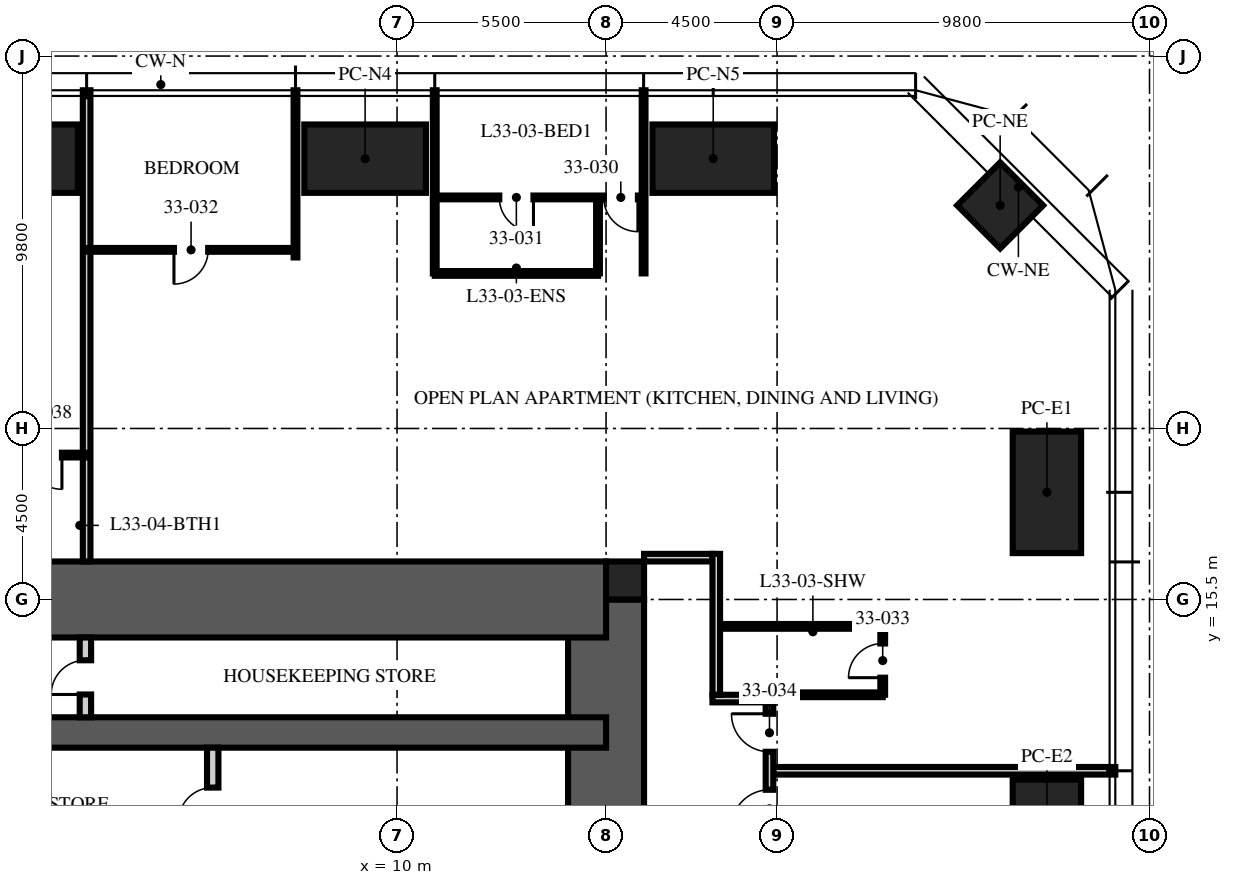
"""IFC4 building model, lengths in metres.
Left out: names, types, materials, properties, quantities, classifications, styles, units other than length and angle.
Written with IfcOpenShell. Run it as: python <this file> out.ifc"""

import sys

from ifc_helpers import new_model, si_unit, direction, frame, frame_2d, origin, origin_2d, place, context, subcontext, project, spatial, rectangle, extrude, element, fill, save


model = new_model("IFC4")
c1 = context("Model", 3, precision=1e-05, world=origin(), true_north=direction((0.0, 1.0)))
c2 = subcontext(c1, "Body", "Model", "MODEL_VIEW")
j1 = project(units=[si_unit("LENGTHUNIT", "METRE"), si_unit("PLANEANGLEUNIT", "RADIAN")], contexts=[c1])
p1 = place(None, origin())
s1 = spatial("IfcSite", under=j1, at=p1, CompositionType="ELEMENT")
p2 = place(p1, origin())
s2 = spatial("IfcBuilding", under=s1, at=p2, CompositionType="ELEMENT")
p3 = place(p2, frame((0.0, 0.0, 133.5)))
s3 = spatial("IfcBuildingStorey", under=s2, at=p3, CompositionType="ELEMENT", Elevation=133.5)
p4 = place(p3, frame((15.5, -15.5, -0.25), z_axis=(0.0, 0.0, 1.0), x_axis=(0.0, 1.0, 0.0)))
e1 = element("IfcWall", 1, at=p4, inside=s3, PredefinedType="SHEAR", context=c2, shape_type="SweptSolid", body=[
    extrude(rectangle(XDim=31.0, YDim=2.0, at=frame_2d((15.5, 0.0))), origin(), (0.0, 0.0, 1.0), 3.75),
])
p5 = place(p4, frame((6.5, 0.0, 0.25)))
e2 = element("IfcOpeningElement", 2, at=p5, cuts=e1, PredefinedType="OPENING", context=c2, shape_type="SweptSolid", body=[
    extrude(rectangle(XDim=1.2, YDim=2.1, at=frame_2d((0.6, 1.05))), frame((0.0, 1.01, 0.0), z_axis=(0.0, -1.0, 0.0), x_axis=(1.0, 0.0, 0.0)), (0.0, 0.0, 1.0), 2.02),
])
p6 = place(p4, frame((23.0, 0.0, 0.25)))
e3 = element("IfcOpeningElement", 3, at=p6, cuts=e1, PredefinedType="OPENING", context=c2, shape_type="SweptSolid", body=[
    extrude(rectangle(XDim=1.8, YDim=2.1, at=frame_2d((0.9, 1.05))), frame((0.0, 1.01, 0.0), z_axis=(0.0, -1.0, 0.0), x_axis=(1.0, 0.0, 0.0)), (0.0, 0.0, 1.0), 2.02),
])
p7 = place(p3, frame((-15.5, 15.5, -0.25), z_axis=(0.0, 0.0, 1.0), x_axis=(1.0, 0.0, 0.0)))
e4 = element("IfcWall", 4, at=p7, inside=s3, PredefinedType="SHEAR", context=c2, shape_type="SweptSolid", body=[
    extrude(rectangle(XDim=31.0, YDim=2.0, at=frame_2d((15.5, 0.0))), origin(), (0.0, 0.0, 1.0), 3.75),
])
p8 = place(p7, frame((5.0, 0.0, 0.25)))
e5 = element("IfcOpeningElement", 5, at=p8, cuts=e4, PredefinedType="OPENING", context=c2, shape_type="SweptSolid", body=[
    extrude(rectangle(XDim=1.0, YDim=2.1, at=frame_2d((0.5, 1.05))), frame((0.0, 1.01, 0.0), z_axis=(0.0, -1.0, 0.0), x_axis=(1.0, 0.0, 0.0)), (0.0, 0.0, 1.0), 2.02),
])
p9 = place(p3, frame((-15.5, 12.0, -0.25), z_axis=(0.0, 0.0, 1.0), x_axis=(1.0, 0.0, 0.0)))
e6 = element("IfcWall", 6, at=p9, inside=s3, PredefinedType="SHEAR", context=c2, shape_type="SweptSolid", body=[
    extrude(rectangle(XDim=31.0, YDim=0.8, at=frame_2d((15.5, 0.0))), origin(), (0.0, 0.0, 1.0), 3.75),
])
p10 = place(p3, frame((16.0, 16.0, -0.25), z_axis=(0.0, 0.0, 1.0), x_axis=(1.0, 0.0, 0.0)))
e7 = element("IfcColumn", 7, at=p10, inside=s3, PredefinedType="COLUMN", context=c2, shape_type="SweptSolid", body=[
    extrude(rectangle(XDim=1.0, YDim=1.0, at=origin_2d()), origin(), (0.0, 0.0, 1.0), 3.75),
])
for number, where, z_axis, x_axis in (
    (8, (0.0, 27.1, 0.0), (0.0, 0.0, 1.0), (1.0, 0.0, 0.0)),
    (9, (9.16, 27.1, 0.0), (0.0, 0.0, 1.0), (1.0, 0.0, 0.0)),
    (10, (18.32, 27.1, 0.0), (0.0, 0.0, 1.0), (1.0, 0.0, 0.0)),
    (11, (27.1, 18.32, 0.0), (0.0, 0.0, 1.0), (0.0, 1.0, 0.0)),
    (12, (27.1, 9.16, 0.0), (0.0, 0.0, 1.0), (0.0, 1.0, 0.0)),
):
    element("IfcColumn", number, at=place(p3, frame(where, z_axis=z_axis, x_axis=x_axis)), inside=s3, PredefinedType="COLUMN", context=c2, shape_type="SweptSolid", body=[
        extrude(rectangle(XDim=3.2, YDim=1.8, at=origin_2d()), origin(), (0.0, 0.0, 1.0), 3.75),
    ])
p11 = place(p3, frame((25.87, 25.87, 0.0), z_axis=(0.0, 0.0, 1.0), x_axis=(0.707106781187, -0.707106781187, 0.0)))
e13 = element("IfcColumn", 13, at=p11, inside=s3, PredefinedType="COLUMN", context=c2, shape_type="SweptSolid", body=[
    extrude(rectangle(XDim=1.6, YDim=1.6, at=origin_2d()), origin(), (0.0, 0.0, 1.0), 3.75),
])
p12 = place(p3, frame((5.15, 5.3, 0.0), z_axis=(0.0, 0.0, 1.0), x_axis=(0.0, 1.0, 0.0)))
e14 = element("IfcWall", 14, at=p12, inside=s3, PredefinedType="PARTITIONING", context=c2, shape_type="SweptSolid", body=[
    extrude(rectangle(XDim=6.3, YDim=0.3, at=frame_2d((3.15, 0.0))), origin(), (0.0, 0.0, 1.0), 3.5),
])
p13 = place(p12, frame((4.35, 0.0, 0.0)))
e15 = element("IfcOpeningElement", 15, at=p13, cuts=e14, PredefinedType="OPENING", context=c2, shape_type="SweptSolid", body=[
    extrude(rectangle(XDim=0.9, YDim=2.1, at=frame_2d((0.45, 1.05))), frame((0.0, 0.16, 0.0), z_axis=(0.0, -1.0, 0.0), x_axis=(1.0, 0.0, 0.0)), (0.0, 0.0, 1.0), 0.32),
])
p14 = place(p3, frame((1.8, 12.4, 0.0), z_axis=(0.0, 0.0, 1.0), x_axis=(0.0, 1.0, 0.0)))
e16 = element("IfcWall", 16, at=p14, inside=s3, PredefinedType="PARTITIONING", context=c2, shape_type="SweptSolid", body=[
    extrude(rectangle(XDim=2.1, YDim=0.3, at=frame_2d((1.05, 0.0))), origin(), (0.0, 0.0, 1.0), 3.5),
])
p15 = place(p14, frame((0.6, 0.0, 0.0)))
e17 = element("IfcOpeningElement", 17, at=p15, cuts=e16, PredefinedType="OPENING", context=c2, shape_type="SweptSolid", body=[
    extrude(rectangle(XDim=0.9, YDim=2.1, at=frame_2d((0.45, 1.05))), frame((0.0, 0.16, 0.0), z_axis=(0.0, -1.0, 0.0), x_axis=(1.0, 0.0, 0.0)), (0.0, 0.0, 1.0), 0.32),
])
p16 = place(p3, frame((16.5, 16.6, 0.0), z_axis=(0.0, 0.0, 1.0), x_axis=(1.0, 0.0, 0.0)))
e18 = element("IfcWall", 18, at=p16, inside=s3, PredefinedType="PARTITIONING", context=c2, shape_type="SweptSolid", body=[
    extrude(rectangle(XDim=1.8, YDim=0.2, at=frame_2d((0.9, 0.0))), origin(), (0.0, 0.0, 1.0), 2.3),
])
p17 = place(p3, frame((19.9, 10.992, 0.0), z_axis=(0.0, 0.0, 1.0), x_axis=(1.0, 0.0, 0.0)))
e19 = element("IfcWall", 19, at=p17, inside=s3, PredefinedType="PARTITIONING", context=c2, shape_type="SweptSolid", body=[
    extrude(rectangle(XDim=9.0, YDim=0.2, at=frame_2d((4.5, 0.0))), origin(), (0.0, 0.0, 1.0), 2.81),
])
for number, where, z_axis, x_axis in (
    (20, (16.488, 24.08, 0.0), (0.0, 0.0, 1.0), (0.0, 1.0, 0.0)),
    (21, (10.992, 24.08, 0.0), (0.0, 0.0, 1.0), (0.0, 1.0, 0.0)),
):
    element("IfcWall", number, at=place(p3, frame(where, z_axis=z_axis, x_axis=x_axis)), inside=s3, PredefinedType="PARTITIONING", context=c2, shape_type="SweptSolid", body=[
        extrude(rectangle(XDim=4.82, YDim=0.1, at=frame_2d((2.41, 0.0))), origin(), (0.0, 0.0, 1.0), 2.81),
    ])
p18 = place(p3, frame((7.328, 24.5, 0.0), z_axis=(0.0, 0.0, 1.0), x_axis=(0.0, 1.0, 0.0)))
e22 = element("IfcWall", 22, at=p18, inside=s3, PredefinedType="PARTITIONING", context=c2, shape_type="SweptSolid", body=[
    extrude(rectangle(XDim=4.4, YDim=0.1, at=frame_2d((2.2, 0.0))), origin(), (0.0, 0.0, 1.0), 2.81),
])
p19 = place(p3, frame((1.832, 16.5, 0.0), z_axis=(0.0, 0.0, 1.0), x_axis=(0.0, 1.0, 0.0)))
e23 = element("IfcWall", 23, at=p19, inside=s3, PredefinedType="PARTITIONING", context=c2, shape_type="SweptSolid", body=[
    extrude(rectangle(XDim=12.4, YDim=0.2, at=frame_2d((6.2, 0.0))), origin(), (0.0, 0.0, 1.0), 2.81),
])
p20 = place(p3, frame((16.488, 26.08, 0.0), z_axis=(0.0, 0.0, 1.0), x_axis=(-1.0, 0.0, 0.0)))
e24 = element("IfcWall", 24, at=p20, inside=s3, PredefinedType="PARTITIONING", context=c2, shape_type="SweptSolid", body=[
    extrude(rectangle(XDim=5.496, YDim=0.1, at=frame_2d((2.748, 0.0))), origin(), (0.0, 0.0, 1.0), 2.81),
])
p21 = place(p20, frame((0.15, 0.0, 0.0)))
e25 = element("IfcOpeningElement", 25, at=p21, cuts=e24, PredefinedType="OPENING", context=c2, shape_type="SweptSolid", body=[
    extrude(rectangle(XDim=0.9, YDim=2.1, at=frame_2d((0.45, 1.05))), frame((0.0, 0.06, 0.0), z_axis=(0.0, -1.0, 0.0), x_axis=(1.0, 0.0, 0.0)), (0.0, 0.0, 1.0), 0.12),
])
p22 = place(p20, frame((2.898, 0.0, 0.0)))
e26 = element("IfcOpeningElement", 26, at=p22, cuts=e24, PredefinedType="OPENING", context=c2, shape_type="SweptSolid", body=[
    extrude(rectangle(XDim=0.9, YDim=2.1, at=frame_2d((0.45, 1.05))), frame((0.0, 0.06, 0.0), z_axis=(0.0, -1.0, 0.0), x_axis=(1.0, 0.0, 0.0)), (0.0, 0.0, 1.0), 0.12),
])
p23 = place(p3, frame((15.288, 24.08, 0.0), z_axis=(0.0, 0.0, 1.0), x_axis=(0.0, 1.0, 0.0)))
e27 = element("IfcWall", 27, at=p23, inside=s3, PredefinedType="PARTITIONING", context=c2, shape_type="SweptSolid", body=[
    extrude(rectangle(XDim=2.0, YDim=0.1, at=frame_2d((1.0, 0.0))), origin(), (0.0, 0.0, 1.0), 3.5),
])
p24 = place(p3, frame((15.288, 24.08, 0.0), z_axis=(0.0, 0.0, 1.0), x_axis=(-1.0, 0.0, 0.0)))
e28 = element("IfcWall", 28, at=p24, inside=s3, PredefinedType="PARTITIONING", context=c2, shape_type="SweptSolid", body=[
    extrude(rectangle(XDim=4.296, YDim=0.125, at=frame_2d((2.148, 0.0))), origin(), (0.0, 0.0, 1.0), 2.81),
])
p25 = place(p3, frame((7.328, 24.7, 0.0), z_axis=(0.0, 0.0, 1.0), x_axis=(-1.0, 0.0, 0.0)))
e29 = element("IfcWall", 29, at=p25, inside=s3, PredefinedType="PARTITIONING", context=c2, shape_type="SweptSolid", body=[
    extrude(rectangle(XDim=5.496, YDim=0.1, at=frame_2d((2.748, 0.0))), origin(), (0.0, 0.0, 1.0), 2.81),
])
p26 = place(p25, frame((2.298, 0.0, 0.0)))
e30 = element("IfcOpeningElement", 30, at=p26, cuts=e29, PredefinedType="OPENING", context=c2, shape_type="SweptSolid", body=[
    extrude(rectangle(XDim=0.9, YDim=2.1, at=frame_2d((0.45, 1.05))), frame((0.0, 0.06, 0.0), z_axis=(0.0, -1.0, 0.0), x_axis=(1.0, 0.0, 0.0)), (0.0, 0.0, 1.0), 0.12),
])
p27 = place(p3, frame((22.78, 12.992, 0.0), z_axis=(0.0, 0.0, 1.0), x_axis=(0.0, 1.0, 0.0)))
e31 = element("IfcWall", 31, at=p27, inside=s3, PredefinedType="PARTITIONING", context=c2, shape_type="SweptSolid", body=[
    extrude(rectangle(XDim=1.8, YDim=0.125, at=frame_2d((0.9, 0.0))), origin(), (0.0, 0.0, 1.0), 2.81),
])
p28 = place(p27, frame((0.45, 0.0, 0.0)))
e32 = element("IfcOpeningElement", 32, at=p28, cuts=e31, PredefinedType="OPENING", context=c2, shape_type="SweptSolid", body=[
    extrude(rectangle(XDim=0.9, YDim=2.1, at=frame_2d((0.45, 1.05))), frame((0.0, 0.073, 0.0), z_axis=(0.0, -1.0, 0.0), x_axis=(1.0, 0.0, 0.0)), (0.0, 0.0, 1.0), 0.145),
])
p29 = place(p3, frame((19.97, 12.992, 0.0), z_axis=(0.0, 0.0, 1.0), x_axis=(1.0, 0.0, 0.0)))
e33 = element("IfcWall", 33, at=p29, inside=s3, PredefinedType="PARTITIONING", context=c2, shape_type="SweptSolid", body=[
    extrude(rectangle(XDim=2.81, YDim=0.125, at=frame_2d((1.405, 0.0))), origin(), (0.0, 0.0, 1.0), 3.5),
])
p30 = place(p3, frame((18.5, 14.792, 0.0), z_axis=(0.0, 0.0, 1.0), x_axis=(1.0, 0.0, 0.0)))
e34 = element("IfcWall", 34, at=p30, inside=s3, PredefinedType="PARTITIONING", context=c2, shape_type="SweptSolid", body=[
    extrude(rectangle(XDim=4.28, YDim=0.125, at=frame_2d((2.14, 0.0))), origin(), (0.0, 0.0, 1.0), 3.5),
])
p31 = place(p3, frame((1.832, 19.3, 0.0), z_axis=(0.0, 0.0, 1.0), x_axis=(-1.0, 0.0, 0.0)))
e35 = element("IfcWall", 35, at=p31, inside=s3, PredefinedType="PARTITIONING", context=c2, shape_type="SweptSolid", body=[
    extrude(rectangle(XDim=2.2, YDim=0.125, at=frame_2d((1.1, 0.0))), origin(), (0.0, 0.0, 1.0), 2.7),
])
p32 = place(p31, frame((0.65, 0.0, 0.0)))
e36 = element("IfcOpeningElement", 36, at=p32, cuts=e35, PredefinedType="OPENING", context=c2, shape_type="SweptSolid", body=[
    extrude(rectangle(XDim=0.9, YDim=2.1, at=frame_2d((0.45, 1.05))), frame((0.0, 0.073, 0.0), z_axis=(0.0, -1.0, 0.0), x_axis=(1.0, 0.0, 0.0)), (0.0, 0.0, 1.0), 0.145),
])
p33 = place(p3, frame((18.3, 12.892, 0.0), z_axis=(0.0, 0.0, 1.0), x_axis=(1.0, 0.0, 0.0)))
e37 = element("IfcWall", 37, at=p33, inside=s3, PredefinedType="PARTITIONING", context=c2, shape_type="SweptSolid", body=[
    extrude(rectangle(XDim=1.6, YDim=0.2, at=frame_2d((0.8, 0.0))), origin(), (0.0, 0.0, 1.0), 3.5),
])
p34 = place(p3, frame((19.8, 9.192, 0.0), z_axis=(0.0, 0.0, 1.0), x_axis=(0.0, 1.0, 0.0)))
e38 = element("IfcWall", 38, at=p34, inside=s3, PredefinedType="PARTITIONING", context=c2, shape_type="SweptSolid", body=[
    extrude(rectangle(XDim=3.6, YDim=0.2, at=frame_2d((1.8, 0.0))), origin(), (0.0, 0.0, 1.0), 2.7),
])
p35 = place(p34, frame((0.3, 0.0, 0.0)))
e39 = element("IfcOpeningElement", 39, at=p35, cuts=e38, PredefinedType="OPENING", context=c2, shape_type="SweptSolid", body=[
    extrude(rectangle(XDim=1.0, YDim=2.2, at=frame_2d((0.5, 1.1))), frame((0.0, 0.11, 0.0), z_axis=(0.0, -1.0, 0.0), x_axis=(1.0, 0.0, 0.0)), (0.0, 0.0, 1.0), 0.22),
])
p36 = place(p34, frame((2.3, 0.0, 0.0)))
e40 = element("IfcOpeningElement", 40, at=p36, cuts=e38, PredefinedType="OPENING", context=c2, shape_type="SweptSolid", body=[
    extrude(rectangle(XDim=1.0, YDim=2.2, at=frame_2d((0.5, 1.1))), frame((0.0, 0.11, 0.0), z_axis=(0.0, -1.0, 0.0), x_axis=(1.0, 0.0, 0.0)), (0.0, 0.0, 1.0), 0.22),
])
p37 = place(p3, frame((18.4, 12.992, 0.0), z_axis=(0.0, 0.0, 1.0), x_axis=(0.0, 1.0, 0.0)))
e41 = element("IfcWall", 41, at=p37, inside=s3, PredefinedType="PARTITIONING", context=c2, shape_type="SweptSolid", body=[
    extrude(rectangle(XDim=3.708, YDim=0.2, at=frame_2d((1.854, 0.0))), origin(), (0.0, 0.0, 1.0), 2.81),
])
p38 = place(p13, origin())
e42 = element("IfcDoor", 42, at=p38, inside=s3, OperationType="SINGLE_SWING_LEFT", PredefinedType="DOOR", context=c2, shape_type="SweptSolid", body=[
    extrude(rectangle(XDim=0.9, YDim=2.1, at=frame_2d((0.45, 1.05))), frame((0.0, 0.025, 0.0), z_axis=(0.0, -1.0, 0.0), x_axis=(1.0, 0.0, 0.0)), (0.0, 0.0, 1.0), 0.05),
])
fill(e15, e42)
p39 = place(p15, origin())
e43 = element("IfcDoor", 43, at=p39, inside=s3, OperationType="SINGLE_SWING_LEFT", PredefinedType="DOOR", context=c2, shape_type="SweptSolid", body=[
    extrude(rectangle(XDim=0.9, YDim=2.1, at=frame_2d((0.45, 1.05))), frame((0.0, 0.025, 0.0), z_axis=(0.0, -1.0, 0.0), x_axis=(1.0, 0.0, 0.0)), (0.0, 0.0, 1.0), 0.05),
])
fill(e17, e43)
p40 = place(p35, origin())
e44 = element("IfcDoor", 44, at=p40, inside=s3, OperationType="SINGLE_SWING_LEFT", PredefinedType="DOOR", context=c2, shape_type="SweptSolid", body=[
    extrude(rectangle(XDim=1.0, YDim=2.2, at=frame_2d((0.5, 1.1))), frame((0.0, 0.025, 0.0), z_axis=(0.0, -1.0, 0.0), x_axis=(1.0, 0.0, 0.0)), (0.0, 0.0, 1.0), 0.05),
])
fill(e39, e44)
p41 = place(p21, origin())
e45 = element("IfcDoor", 45, at=p41, inside=s3, OperationType="SINGLE_SWING_LEFT", PredefinedType="DOOR", context=c2, shape_type="SweptSolid", body=[
    extrude(rectangle(XDim=0.9, YDim=2.1, at=frame_2d((0.45, 1.05))), frame((0.0, 0.025, 0.0), z_axis=(0.0, -1.0, 0.0), x_axis=(1.0, 0.0, 0.0)), (0.0, 0.0, 1.0), 0.05),
])
fill(e25, e45)
p42 = place(p22, origin())
e46 = element("IfcDoor", 46, at=p42, inside=s3, OperationType="SINGLE_SWING_LEFT", PredefinedType="DOOR", context=c2, shape_type="SweptSolid", body=[
    extrude(rectangle(XDim=0.9, YDim=2.1, at=frame_2d((0.45, 1.05))), frame((0.0, 0.025, 0.0), z_axis=(0.0, -1.0, 0.0), x_axis=(1.0, 0.0, 0.0)), (0.0, 0.0, 1.0), 0.05),
])
fill(e26, e46)
p43 = place(p26, origin())
e47 = element("IfcDoor", 47, at=p43, inside=s3, OperationType="SINGLE_SWING_RIGHT", PredefinedType="DOOR", context=c2, shape_type="SweptSolid", body=[
    extrude(rectangle(XDim=0.9, YDim=2.1, at=frame_2d((0.45, 1.05))), frame((0.0, 0.025, 0.0), z_axis=(0.0, -1.0, 0.0), x_axis=(1.0, 0.0, 0.0)), (0.0, 0.0, 1.0), 0.05),
])
fill(e30, e47)
p44 = place(p28, origin())
e48 = element("IfcDoor", 48, at=p44, inside=s3, OperationType="SINGLE_SWING_LEFT", PredefinedType="DOOR", context=c2, shape_type="SweptSolid", body=[
    extrude(rectangle(XDim=0.9, YDim=2.1, at=frame_2d((0.45, 1.05))), frame((0.0, 0.025, 0.0), z_axis=(0.0, -1.0, 0.0), x_axis=(1.0, 0.0, 0.0)), (0.0, 0.0, 1.0), 0.05),
])
fill(e32, e48)
p45 = place(p36, origin())
e49 = element("IfcDoor", 49, at=p45, inside=s3, OperationType="SINGLE_SWING_RIGHT", PredefinedType="DOOR", context=c2, shape_type="SweptSolid", body=[
    extrude(rectangle(XDim=1.0, YDim=2.2, at=frame_2d((0.5, 1.1))), frame((0.0, 0.025, 0.0), z_axis=(0.0, -1.0, 0.0), x_axis=(1.0, 0.0, 0.0)), (0.0, 0.0, 1.0), 0.05),
])
fill(e40, e49)
p46 = place(p32, origin())
e50 = element("IfcDoor", 50, at=p46, inside=s3, OperationType="SINGLE_SWING_LEFT", PredefinedType="DOOR", context=c2, shape_type="SweptSolid", body=[
    extrude(rectangle(XDim=0.9, YDim=2.1, at=frame_2d((0.45, 1.05))), frame((0.0, 0.025, 0.0), z_axis=(0.0, -1.0, 0.0), x_axis=(1.0, 0.0, 0.0)), (0.0, 0.0, 1.0), 0.05),
])
fill(e36, e50)
save(model, sys.argv[1])
